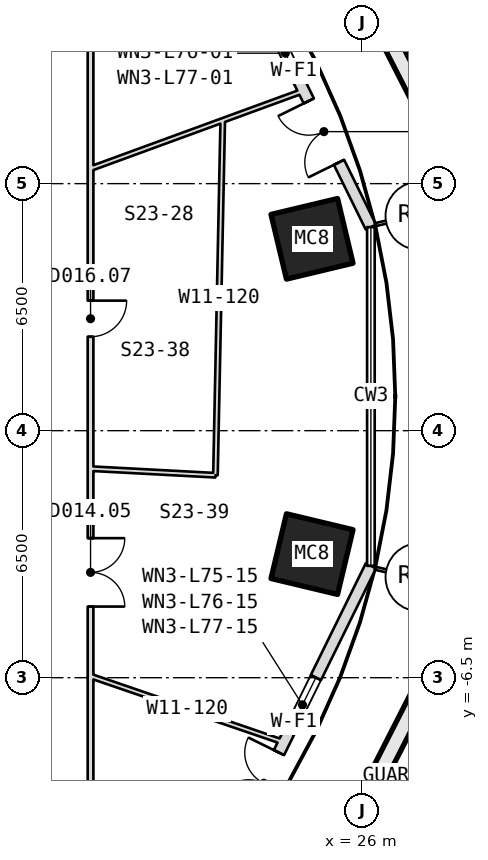
"""IFC4 building model, lengths in metres.
Left out: names, types, materials, properties, quantities, classifications, styles, units other than length and angle.
Written with IfcOpenShell. Run it as: python <this file> out.ifc"""

import sys

from ifc_helpers import new_model, si_unit, direction, frame, frame_2d, origin, origin_2d, place, context, subcontext, project, spatial, rectangle, hollow_rectangle, extrude, element, fill, save


model = new_model("IFC4")
c1 = context("Model", 3, precision=1e-05, world=origin(), true_north=direction((0.0, 1.0)))
c2 = subcontext(c1, "Body", "Model", "MODEL_VIEW")
j1 = project(units=[si_unit("LENGTHUNIT", "METRE"), si_unit("PLANEANGLEUNIT", "RADIAN")], contexts=[c1])
p1 = place(None, origin())
s1 = spatial("IfcSite", under=j1, at=p1, CompositionType="ELEMENT")
p2 = place(p1, origin())
s2 = spatial("IfcBuilding", under=s1, at=p2, CompositionType="ELEMENT")
p3 = place(p2, frame((0.0, 0.0, 334.3)))
s3 = spatial("IfcBuildingStorey", under=s2, at=p3, CompositionType="ELEMENT", Elevation=334.3)
for number, where, z_axis, x_axis in (
    (1, (24.678, 5.048, -0.18), (0.0, 0.0, 1.0), (0.233, -0.973, 0.0)),
    (2, (24.678, -3.248, -0.18), (0.0, 0.0, 1.0), (-0.233, -0.973, 0.0)),
):
    element("IfcColumn", number, at=place(p3, frame(where, z_axis=z_axis, x_axis=x_axis)), inside=s3, PredefinedType="COLUMN", context=c2, shape_type="SweptSolid", body=[
        extrude(hollow_rectangle(XDim=1.75, YDim=1.8, WallThickness=0.055, at=origin_2d()), origin(), (0.0, 0.0, 1.0), 4.15),
    ])
p4 = place(p3, frame((26.227, 5.356, 0.0), z_axis=(0.0, 0.0, 1.0), x_axis=(-0.441682707494, 0.89717132472, 0.0)))
e3 = element("IfcWall", 3, at=p4, inside=s3, PredefinedType="SOLIDWALL", context=c2, shape_type="SweptSolid", body=[
    extrude(rectangle(XDim=9.178, YDim=0.3, at=frame_2d((4.589, 0.0))), origin(), (0.0, 0.0, 1.0), 3.97),
])
p5 = place(p4, frame((1.9, 0.0, 0.0)))
e4 = element("IfcOpeningElement", 4, at=p5, cuts=e3, PredefinedType="OPENING", context=c2, shape_type="SweptSolid", body=[
    extrude(rectangle(XDim=1.8, YDim=2.4, at=frame_2d((0.9, 1.2))), frame((0.0, 0.16, 0.0), z_axis=(0.0, -1.0, 0.0), x_axis=(1.0, 0.0, 0.0)), (0.0, 0.0, 1.0), 0.32),
])
p6 = place(p4, frame((4.3, 0.0, 0.9)))
e5 = element("IfcOpeningElement", 5, at=p6, cuts=e3, PredefinedType="OPENING", context=c2, shape_type="SweptSolid", body=[
    extrude(rectangle(XDim=1.6, YDim=1.5, at=frame_2d((0.8, 0.75))), frame((0.0, 0.16, 0.0), z_axis=(0.0, -1.0, 0.0), x_axis=(1.0, 0.0, 0.0)), (0.0, 0.0, 1.0), 0.32),
])
p7 = place(p3, frame((22.174, -11.79, 0.0), z_axis=(0.0, 0.0, 1.0), x_axis=(0.441682707494, 0.89717132472, 0.0)))
e6 = element("IfcWall", 6, at=p7, inside=s3, PredefinedType="SOLIDWALL", context=c2, shape_type="SweptSolid", body=[
    extrude(rectangle(XDim=9.178, YDim=0.3, at=frame_2d((4.589, 0.0))), origin(), (0.0, 0.0, 1.0), 3.97),
])
p8 = place(p7, frame((1.9, 0.0, 0.0)))
e7 = element("IfcOpeningElement", 7, at=p8, cuts=e6, PredefinedType="OPENING", context=c2, shape_type="SweptSolid", body=[
    extrude(rectangle(XDim=1.8, YDim=2.4, at=frame_2d((0.9, 1.2))), frame((0.0, 0.16, 0.0), z_axis=(0.0, -1.0, 0.0), x_axis=(1.0, 0.0, 0.0)), (0.0, 0.0, 1.0), 0.32),
])
p9 = place(p7, frame((4.3, 0.0, 0.9)))
e8 = element("IfcOpeningElement", 8, at=p9, cuts=e6, PredefinedType="OPENING", context=c2, shape_type="SweptSolid", body=[
    extrude(rectangle(XDim=1.6, YDim=1.5, at=frame_2d((0.8, 0.75))), frame((0.0, 0.16, 0.0), z_axis=(0.0, -1.0, 0.0), x_axis=(1.0, 0.0, 0.0)), (0.0, 0.0, 1.0), 0.32),
])
p10 = place(p3, frame((18.85, -6.458, 0.0), z_axis=(0.0, 0.0, 1.0), x_axis=(0.946023473626, -0.32409811377, 0.0)))
e9 = element("IfcWall", 9, at=p10, inside=s3, PredefinedType="PARTITIONING", context=c2, shape_type="SweptSolid", body=[
    extrude(rectangle(XDim=5.381, YDim=0.12, at=frame_2d((2.69, 0.0))), origin(), (0.0, 0.0, 1.0), 3.97),
])
p11 = place(p3, frame((18.85, 6.893, 0.0), z_axis=(0.0, 0.0, 1.0), x_axis=(0.939166586635, 0.34346196667, 0.0)))
e10 = element("IfcWall", 10, at=p11, inside=s3, PredefinedType="PARTITIONING", context=c2, shape_type="SweptSolid", body=[
    extrude(rectangle(XDim=5.974, YDim=0.12, at=frame_2d((2.987, 0.0))), origin(), (0.0, 0.0, 1.0), 3.97),
])
p12 = place(p3, frame((18.85, 11.18, 0.0), z_axis=(0.0, 0.0, 1.0), x_axis=(0.0, -1.0, 0.0)))
e11 = element("IfcWall", 11, at=p12, inside=s3, PredefinedType="PARTITIONING", context=c2, shape_type="SweptSolid", body=[
    extrude(rectangle(XDim=22.361, YDim=0.15, at=frame_2d((11.18, 0.0))), origin(), (0.0, 0.0, 1.0), 3.97),
])
p13 = place(p12, frame((7.759, 0.0, 0.0)))
e12 = element("IfcOpeningElement", 12, at=p13, cuts=e11, PredefinedType="OPENING", context=c2, shape_type="SweptSolid", body=[
    extrude(rectangle(XDim=0.95, YDim=2.1, at=frame_2d((0.475, 1.05))), frame((0.0, 0.085, 0.0), z_axis=(0.0, -1.0, 0.0), x_axis=(1.0, 0.0, 0.0)), (0.0, 0.0, 1.0), 0.17),
])
p14 = place(p12, frame((14.009, 0.0, 0.0)))
e13 = element("IfcOpeningElement", 13, at=p14, cuts=e11, PredefinedType="OPENING", context=c2, shape_type="SweptSolid", body=[
    extrude(rectangle(XDim=1.8, YDim=2.1, at=frame_2d((0.9, 1.05))), frame((0.0, 0.085, 0.0), z_axis=(0.0, -1.0, 0.0), x_axis=(1.0, 0.0, 0.0)), (0.0, 0.0, 1.0), 0.17),
])
p15 = place(p3, frame((22.137, -1.173, 0.0), z_axis=(0.0, 0.0, 1.0), x_axis=(0.020545219347, 0.999788924705, 0.0)))
e14 = element("IfcWall", 14, at=p15, inside=s3, PredefinedType="PARTITIONING", context=c2, shape_type="SweptSolid", body=[
    extrude(rectangle(XDim=9.34, YDim=0.12, at=frame_2d((4.67, 0.0))), origin(), (0.0, 0.0, 1.0), 3.97),
])
p16 = place(p3, frame((22.137, -1.173, 0.0), z_axis=(0.0, 0.0, 1.0), x_axis=(-0.99860035673, 0.052889767817, 0.0)))
e15 = element("IfcWall", 15, at=p16, inside=s3, PredefinedType="PARTITIONING", context=c2, shape_type="SweptSolid", body=[
    extrude(rectangle(XDim=3.291, YDim=0.12, at=frame_2d((1.646, 0.0))), origin(), (0.0, 0.0, 1.0), 3.97),
])
p17 = place(p5, origin())
e16 = element("IfcDoor", 16, at=p17, inside=s3, OperationType="SINGLE_SWING_LEFT", PredefinedType="DOOR", context=c2, shape_type="SweptSolid", body=[
    extrude(rectangle(XDim=1.8, YDim=2.4, at=frame_2d((0.9, 1.2))), frame((0.0, 0.025, 0.0), z_axis=(0.0, -1.0, 0.0), x_axis=(1.0, 0.0, 0.0)), (0.0, 0.0, 1.0), 0.05),
])
fill(e4, e16)
p18 = place(p6, origin())
e17 = element("IfcWindow", 17, at=p18, inside=s3, PartitioningType="SINGLE_PANEL", PredefinedType="WINDOW", context=c2, shape_type="SweptSolid", body=[
    extrude(rectangle(XDim=1.6, YDim=1.5, at=frame_2d((0.8, 0.75))), frame((0.0, 0.03, 0.0), z_axis=(0.0, -1.0, 0.0), x_axis=(1.0, 0.0, 0.0)), (0.0, 0.0, 1.0), 0.06),
])
fill(e5, e17)
p19 = place(p8, origin())
e18 = element("IfcDoor", 18, at=p19, inside=s3, OperationType="SINGLE_SWING_LEFT", PredefinedType="DOOR", context=c2, shape_type="SweptSolid", body=[
    extrude(rectangle(XDim=1.8, YDim=2.4, at=frame_2d((0.9, 1.2))), frame((0.0, 0.025, 0.0), z_axis=(0.0, -1.0, 0.0), x_axis=(1.0, 0.0, 0.0)), (0.0, 0.0, 1.0), 0.05),
])
fill(e7, e18)
p20 = place(p9, origin())
e19 = element("IfcWindow", 19, at=p20, inside=s3, PartitioningType="SINGLE_PANEL", PredefinedType="WINDOW", context=c2, shape_type="SweptSolid", body=[
    extrude(rectangle(XDim=1.6, YDim=1.5, at=frame_2d((0.8, 0.75))), frame((0.0, 0.03, 0.0), z_axis=(0.0, -1.0, 0.0), x_axis=(1.0, 0.0, 0.0)), (0.0, 0.0, 1.0), 0.06),
])
fill(e8, e19)
p21 = place(p13, origin())
e20 = element("IfcDoor", 20, at=p21, inside=s3, OperationType="SINGLE_SWING_RIGHT", PredefinedType="DOOR", context=c2, shape_type="SweptSolid", body=[
    extrude(rectangle(XDim=0.95, YDim=2.1, at=frame_2d((0.475, 1.05))), frame((0.0, 0.025, 0.0), z_axis=(0.0, -1.0, 0.0), x_axis=(1.0, 0.0, 0.0)), (0.0, 0.0, 1.0), 0.05),
])
fill(e12, e20)
p22 = place(p14, origin())
e21 = element("IfcDoor", 21, at=p22, inside=s3, OperationType="DOUBLE_DOOR_SINGLE_SWING", PredefinedType="DOOR", context=c2, shape_type="SweptSolid", body=[
    extrude(rectangle(XDim=1.8, YDim=2.1, at=frame_2d((0.9, 1.05))), frame((0.0, 0.025, 0.0), z_axis=(0.0, -1.0, 0.0), x_axis=(1.0, 0.0, 0.0)), (0.0, 0.0, 1.0), 0.05),
])
fill(e13, e21)
save(model, sys.argv[1])
